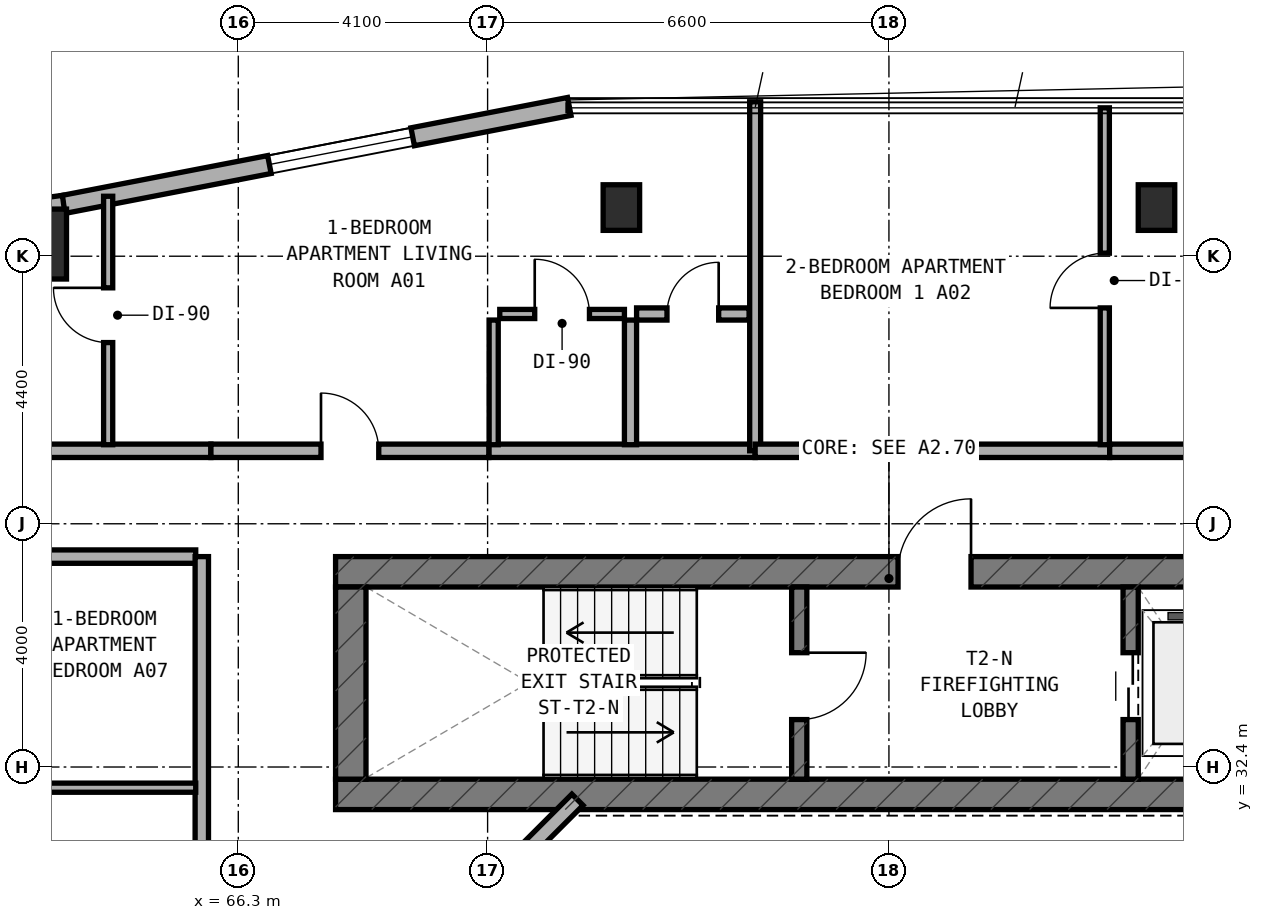
"""IFC4 building model, lengths in metres.
Left out: names, types, materials, properties, quantities, classifications, styles, units other than length and angle.
Written with IfcOpenShell. Run it as: python <this file> out.ifc"""

import sys

from ifc_helpers import new_model, si_unit, direction, frame, frame_2d, origin, origin_2d, place, context, subcontext, project, spatial, rectangle, extrude, element, fill, save


model = new_model("IFC4")
c1 = context("Model", 3, precision=1e-05, world=origin(), true_north=direction((0.0, 1.0)))
c2 = subcontext(c1, "Body", "Model", "MODEL_VIEW")
j1 = project(units=[si_unit("LENGTHUNIT", "METRE"), si_unit("PLANEANGLEUNIT", "RADIAN")], contexts=[c1])
p1 = place(None, origin())
s1 = spatial("IfcSite", under=j1, at=p1, CompositionType="ELEMENT")
p2 = place(p1, origin())
s2 = spatial("IfcBuilding", under=s1, at=p2, CompositionType="ELEMENT")
p3 = place(p2, frame((0.0, 0.0, 80.0)))
s3 = spatial("IfcBuildingStorey", under=s2, at=p3, CompositionType="ELEMENT", Elevation=80.0)
p4 = place(p3, frame((67.9, 31.95, 0.0), z_axis=(0.0, 0.0, 1.0), x_axis=(1.0, 0.0, 0.0)))
e1 = element("IfcWall", 1, at=p4, inside=s3, PredefinedType="SHEAR", context=c2, shape_type="SweptSolid", body=[
    extrude(rectangle(XDim=18.4, YDim=0.5, at=frame_2d((9.2, 0.0))), origin(), (0.0, 0.0, 1.0), 3.5),
])
p5 = place(p3, frame((67.9, 35.61, 0.0), z_axis=(0.0, 0.0, 1.0), x_axis=(1.0, 0.0, 0.0)))
e2 = element("IfcWall", 2, at=p5, inside=s3, PredefinedType="SHEAR", context=c2, shape_type="SweptSolid", body=[
    extrude(rectangle(XDim=18.4, YDim=0.5, at=frame_2d((9.2, 0.0))), origin(), (0.0, 0.0, 1.0), 3.5),
])
p6 = place(p5, frame((9.25, 0.0, 0.0)))
e3 = element("IfcOpeningElement", 3, at=p6, cuts=e2, PredefinedType="OPENING", context=c2, shape_type="SweptSolid", body=[
    extrude(rectangle(XDim=1.2, YDim=2.15, at=frame_2d((0.6, 1.075))), frame((0.0, 0.26, 0.0), z_axis=(0.0, -1.0, 0.0), x_axis=(1.0, 0.0, 0.0)), (0.0, 0.0, 1.0), 0.52),
])
p7 = place(p5, frame((16.85, 0.0, 0.0)))
e4 = element("IfcOpeningElement", 4, at=p7, cuts=e2, PredefinedType="OPENING", context=c2, shape_type="SweptSolid", body=[
    extrude(rectangle(XDim=0.85, YDim=2.1, at=frame_2d((0.425, 1.05))), frame((0.0, 0.26, 0.0), z_axis=(0.0, -1.0, 0.0), x_axis=(1.0, 0.0, 0.0)), (0.0, 0.0, 1.0), 0.52),
])
p8 = place(p3, frame((68.15, 32.2, 0.0), z_axis=(0.0, 0.0, 1.0), x_axis=(0.0, 1.0, 0.0)))
e5 = element("IfcWall", 5, at=p8, inside=s3, PredefinedType="SHEAR", context=c2, shape_type="SweptSolid", body=[
    extrude(rectangle(XDim=3.16, YDim=0.5, at=frame_2d((1.58, 0.0))), origin(), (0.0, 0.0, 1.0), 3.5),
])
p9 = place(p3, frame((75.525, 32.2, 0.0), z_axis=(0.0, 0.0, 1.0), x_axis=(0.0, 1.0, 0.0)))
e6 = element("IfcWall", 6, at=p9, inside=s3, PredefinedType="STANDARD", context=c2, shape_type="SweptSolid", body=[
    extrude(rectangle(XDim=3.16, YDim=0.25, at=frame_2d((1.58, 0.0))), origin(), (0.0, 0.0, 1.0), 3.25),
])
p10 = place(p9, frame((0.98, 0.0, 0.0)))
e7 = element("IfcOpeningElement", 7, at=p10, cuts=e6, PredefinedType="OPENING", context=c2, shape_type="SweptSolid", body=[
    extrude(rectangle(XDim=1.1, YDim=2.15, at=frame_2d((0.55, 1.075))), frame((0.0, 0.135, 0.0), z_axis=(0.0, -1.0, 0.0), x_axis=(1.0, 0.0, 0.0)), (0.0, 0.0, 1.0), 0.27),
])
p11 = place(p3, frame((80.975, 32.2, 0.0), z_axis=(0.0, 0.0, 1.0), x_axis=(0.0, 1.0, 0.0)))
e8 = element("IfcWall", 8, at=p11, inside=s3, PredefinedType="STANDARD", context=c2, shape_type="SweptSolid", body=[
    extrude(rectangle(XDim=3.16, YDim=0.25, at=frame_2d((1.58, 0.0))), origin(), (0.0, 0.0, 1.0), 3.25),
])
p12 = place(p11, frame((0.98, 0.0, 0.0)))
e9 = element("IfcOpeningElement", 9, at=p12, cuts=e8, PredefinedType="OPENING", context=c2, shape_type="SweptSolid", body=[
    extrude(rectangle(XDim=1.1, YDim=2.15, at=frame_2d((0.55, 1.075))), frame((0.0, 0.135, 0.0), z_axis=(0.0, -1.0, 0.0), x_axis=(1.0, 0.0, 0.0)), (0.0, 0.0, 1.0), 0.27),
])
for number, where, z_axis, x_axis in (
    (10, (72.6, 41.6, 0.0), (0.0, 0.0, 1.0), (1.0, 0.0, 0.0)),
    (11, (81.4, 41.6, 0.0), (0.0, 0.0, 1.0), (1.0, 0.0, 0.0)),
):
    element("IfcColumn", number, at=place(p3, frame(where, z_axis=z_axis, x_axis=x_axis)), inside=s3, PredefinedType="COLUMN", context=c2, shape_type="SweptSolid", body=[
        extrude(rectangle(XDim=0.6, YDim=0.75, at=origin_2d()), origin(), (0.0, 0.0, 1.0), 3.5),
    ])
p13 = place(p3, frame((63.0, 41.0, 0.0), z_axis=(0.0, 0.0, 1.0), x_axis=(1.0, 0.0, 0.0)))
e12 = element("IfcColumn", 12, at=p13, inside=s3, PredefinedType="COLUMN", context=c2, shape_type="SweptSolid", body=[
    extrude(rectangle(XDim=0.95, YDim=1.15, at=origin_2d()), origin(), (0.0, 0.0, 1.0), 3.5),
])
p14 = place(p3, frame((71.743, 43.263, 0.0), z_axis=(0.0, 0.0, 1.0), x_axis=(-0.981750199588, -0.190175039396, 0.0)))
e13 = element("IfcWall", 13, at=p14, inside=s3, PredefinedType="STANDARD", context=c2, shape_type="SweptSolid", body=[
    extrude(rectangle(XDim=8.477, YDim=0.3, at=frame_2d((4.238, 0.0))), origin(), (0.0, 0.0, 1.0), 3.25),
])
p15 = place(p14, frame((2.623, 0.0, 0.8)))
e14 = element("IfcOpeningElement", 14, at=p15, cuts=e13, PredefinedType="OPENING", context=c2, shape_type="SweptSolid", body=[
    extrude(rectangle(XDim=2.4, YDim=1.6, at=frame_2d((1.2, 0.8))), frame((0.0, 0.16, 0.0), z_axis=(0.0, -1.0, 0.0), x_axis=(1.0, 0.0, 0.0)), (0.0, 0.0, 1.0), 0.32),
])
p16 = place(p3, frame((63.428, 41.652, 0.0), z_axis=(0.0, 0.0, 1.0), x_axis=(-0.991293937098, -0.131667498923, 0.0)))
e15 = element("IfcWall", 15, at=p16, inside=s3, PredefinedType="STANDARD", context=c2, shape_type="SweptSolid", body=[
    extrude(rectangle(XDim=0.677, YDim=0.3, at=frame_2d((0.338, 0.0))), origin(), (0.0, 0.0, 1.0), 3.25),
])
p17 = place(p3, frame((71.878, 31.862, 0.0), z_axis=(0.0, 0.0, 1.0), x_axis=(-0.707106781187, -0.707106781187, 0.0)))
e16 = element("IfcWall", 16, at=p17, inside=s3, PredefinedType="STANDARD", context=c2, shape_type="SweptSolid", body=[
    extrude(rectangle(XDim=2.311, YDim=0.26, at=frame_2d((1.155, 0.0))), origin(), (0.0, 0.0, 1.0), 3.25),
])
p18 = place(p3, frame((59.36, 37.6, 0.0), z_axis=(0.0, 0.0, 1.0), x_axis=(1.0, 0.0, 0.0)))
e17 = element("IfcWall", 17, at=p18, inside=s3, PredefinedType="SOLIDWALL", context=c2, shape_type="SweptSolid", body=[
    extrude(rectangle(XDim=6.49, YDim=0.22, at=frame_2d((3.245, 0.0))), origin(), (0.0, 0.0, 1.0), 2.945),
])
p19 = place(p3, frame((70.42, 37.6, 0.0), z_axis=(0.0, 0.0, 1.0), x_axis=(1.0, 0.0, 0.0)))
e18 = element("IfcWall", 18, at=p19, inside=s3, PredefinedType="SOLIDWALL", context=c2, shape_type="SweptSolid", body=[
    extrude(rectangle(XDim=4.38, YDim=0.22, at=frame_2d((2.19, 0.0))), origin(), (0.0, 0.0, 1.0), 2.825),
])
p20 = place(p3, frame((65.85, 37.6, 0.0), z_axis=(0.0, 0.0, 1.0), x_axis=(1.0, 0.0, 0.0)))
e19 = element("IfcWall", 19, at=p20, inside=s3, PredefinedType="SOLIDWALL", context=c2, shape_type="SweptSolid", body=[
    extrude(rectangle(XDim=4.57, YDim=0.22, at=frame_2d((2.285, 0.0))), origin(), (0.0, 0.0, 1.0), 3.22),
])
p21 = place(p20, frame((1.81, 0.0, 0.0)))
e20 = element("IfcOpeningElement", 20, at=p21, cuts=e19, PredefinedType="OPENING", context=c2, shape_type="SweptSolid", body=[
    extrude(rectangle(XDim=0.95, YDim=2.1, at=frame_2d((0.475, 1.05))), frame((0.0, 0.12, 0.0), z_axis=(0.0, -1.0, 0.0), x_axis=(1.0, 0.0, 0.0)), (0.0, 0.0, 1.0), 0.24),
])
p22 = place(p3, frame((64.16, 37.7, 0.0), z_axis=(0.0, 0.0, 1.0), x_axis=(0.0, 1.0, 0.0)))
e21 = element("IfcWall", 21, at=p22, inside=s3, PredefinedType="PARTITIONING", context=c2, shape_type="SweptSolid", body=[
    extrude(rectangle(XDim=4.086, YDim=0.15, at=frame_2d((2.043, 0.0))), origin(), (0.0, 0.0, 1.0), 2.945),
])
p23 = place(p22, frame((1.68, 0.0, 0.0)))
e22 = element("IfcOpeningElement", 22, at=p23, cuts=e21, PredefinedType="OPENING", context=c2, shape_type="SweptSolid", body=[
    extrude(rectangle(XDim=0.9, YDim=2.1, at=frame_2d((0.45, 1.05))), frame((0.0, 0.085, 0.0), z_axis=(0.0, -1.0, 0.0), x_axis=(1.0, 0.0, 0.0)), (0.0, 0.0, 1.0), 0.17),
])
p24 = place(p3, frame((72.75, 37.7, 0.0), z_axis=(0.0, 0.0, 1.0), x_axis=(0.0, 1.0, 0.0)))
e23 = element("IfcWall", 23, at=p24, inside=s3, PredefinedType="PLUMBINGWALL", context=c2, shape_type="SweptSolid", body=[
    extrude(rectangle(XDim=2.05, YDim=0.2, at=frame_2d((1.025, 0.0))), origin(), (0.0, 0.0, 1.0), 2.825),
])
p25 = place(p3, frame((70.5, 37.7, 0.0), z_axis=(0.0, 0.0, 1.0), x_axis=(0.0, 1.0, 0.0)))
e24 = element("IfcWall", 24, at=p25, inside=s3, PredefinedType="PARTITIONING", context=c2, shape_type="SweptSolid", body=[
    extrude(rectangle(XDim=2.05, YDim=0.15, at=frame_2d((1.025, 0.0))), origin(), (0.0, 0.0, 1.0), 3.22),
])
p26 = place(p3, frame((72.85, 39.85, 0.0), z_axis=(0.0, 0.0, 1.0), x_axis=(1.0, 0.0, 0.0)))
e25 = element("IfcWall", 25, at=p26, inside=s3, PredefinedType="PLUMBINGWALL", context=c2, shape_type="SweptSolid", body=[
    extrude(rectangle(XDim=1.85, YDim=0.2, at=frame_2d((0.925, 0.0))), origin(), (0.0, 0.0, 1.0), 3.22),
])
p27 = place(p26, frame((0.5, 0.0, 0.0)))
e26 = element("IfcOpeningElement", 26, at=p27, cuts=e25, PredefinedType="OPENING", context=c2, shape_type="SweptSolid", body=[
    extrude(rectangle(XDim=0.85, YDim=2.1, at=frame_2d((0.425, 1.05))), frame((0.0, 0.11, 0.0), z_axis=(0.0, -1.0, 0.0), x_axis=(1.0, 0.0, 0.0)), (0.0, 0.0, 1.0), 0.22),
])
p28 = place(p3, frame((70.6, 39.85, 0.0), z_axis=(0.0, 0.0, 1.0), x_axis=(1.0, 0.0, 0.0)))
e27 = element("IfcWall", 27, at=p28, inside=s3, PredefinedType="PARTITIONING", context=c2, shape_type="SweptSolid", body=[
    extrude(rectangle(XDim=2.05, YDim=0.15, at=frame_2d((1.025, 0.0))), origin(), (0.0, 0.0, 1.0), 2.825),
])
p29 = place(p28, frame((0.575, 0.0, 0.0)))
e28 = element("IfcOpeningElement", 28, at=p29, cuts=e27, PredefinedType="OPENING", context=c2, shape_type="SweptSolid", body=[
    extrude(rectangle(XDim=0.9, YDim=2.1, at=frame_2d((0.45, 1.05))), frame((0.0, 0.085, 0.0), z_axis=(0.0, -1.0, 0.0), x_axis=(1.0, 0.0, 0.0)), (0.0, 0.0, 1.0), 0.17),
])
p30 = place(p3, frame((74.8, 37.6, 0.0), z_axis=(0.0, 0.0, 1.0), x_axis=(0.0, 1.0, 0.0)))
e29 = element("IfcWall", 29, at=p30, inside=s3, PredefinedType="SOLIDWALL", context=c2, shape_type="SweptSolid", body=[
    extrude(rectangle(XDim=5.74, YDim=0.18, at=frame_2d((2.87, 0.0))), origin(), (0.0, 0.0, 1.0), 2.825),
])
p31 = place(p3, frame((74.8, 37.6, 0.0), z_axis=(0.0, 0.0, 1.0), x_axis=(1.0, 0.0, 0.0)))
e30 = element("IfcWall", 30, at=p31, inside=s3, PredefinedType="SOLIDWALL", context=c2, shape_type="SweptSolid", body=[
    extrude(rectangle(XDim=5.83, YDim=0.22, at=frame_2d((2.915, 0.0))), origin(), (0.0, 0.0, 1.0), 3.22),
])
p32 = place(p3, frame((80.63, 37.6, 0.0), z_axis=(0.0, 0.0, 1.0), x_axis=(1.0, 0.0, 0.0)))
e31 = element("IfcWall", 31, at=p32, inside=s3, PredefinedType="SOLIDWALL", context=c2, shape_type="SweptSolid", body=[
    extrude(rectangle(XDim=3.88, YDim=0.22, at=frame_2d((1.94, 0.0))), origin(), (0.0, 0.0, 1.0), 2.825),
])
p33 = place(p32, frame((1.465, 0.0, 0.0)))
e32 = element("IfcOpeningElement", 32, at=p33, cuts=e31, PredefinedType="OPENING", context=c2, shape_type="SweptSolid", body=[
    extrude(rectangle(XDim=0.95, YDim=2.1, at=frame_2d((0.475, 1.05))), frame((0.0, 0.12, 0.0), z_axis=(0.0, -1.0, 0.0), x_axis=(1.0, 0.0, 0.0)), (0.0, 0.0, 1.0), 0.24),
])
p34 = place(p3, frame((80.55, 37.7, 0.0), z_axis=(0.0, 0.0, 1.0), x_axis=(0.0, 1.0, 0.0)))
e33 = element("IfcWall", 33, at=p34, inside=s3, PredefinedType="PARTITIONING", context=c2, shape_type="SweptSolid", body=[
    extrude(rectangle(XDim=5.54, YDim=0.15, at=frame_2d((2.77, 0.0))), origin(), (0.0, 0.0, 1.0), 2.825),
])
p35 = place(p34, frame((2.25, 0.0, 0.0)))
e34 = element("IfcOpeningElement", 34, at=p35, cuts=e33, PredefinedType="OPENING", context=c2, shape_type="SweptSolid", body=[
    extrude(rectangle(XDim=0.9, YDim=2.1, at=frame_2d((0.45, 1.05))), frame((0.0, 0.085, 0.0), z_axis=(0.0, -1.0, 0.0), x_axis=(1.0, 0.0, 0.0)), (0.0, 0.0, 1.0), 0.17),
])
p36 = place(p3, frame((59.52, 35.86, 0.0), z_axis=(0.0, 0.0, 1.0), x_axis=(1.0, 0.0, 0.0)))
e35 = element("IfcWall", 35, at=p36, inside=s3, PredefinedType="SOLIDWALL", context=c2, shape_type="SweptSolid", body=[
    extrude(rectangle(XDim=6.08, YDim=0.22, at=frame_2d((3.04, 0.0))), origin(), (0.0, 0.0, 1.0), 2.945),
])
p37 = place(p3, frame((65.7, 27.9, 0.0), z_axis=(0.0, 0.0, 1.0), x_axis=(0.0, 1.0, 0.0)))
e36 = element("IfcWall", 36, at=p37, inside=s3, PredefinedType="SOLIDWALL", context=c2, shape_type="SweptSolid", body=[
    extrude(rectangle(XDim=7.96, YDim=0.22, at=frame_2d((3.98, 0.0))), origin(), (0.0, 0.0, 1.0), 2.825),
])
p38 = place(p37, frame((1.605, 0.0, 0.0)))
e37 = element("IfcOpeningElement", 37, at=p38, cuts=e36, PredefinedType="OPENING", context=c2, shape_type="SweptSolid", body=[
    extrude(rectangle(XDim=0.95, YDim=2.1, at=frame_2d((0.475, 1.05))), frame((0.0, 0.12, 0.0), z_axis=(0.0, -1.0, 0.0), x_axis=(1.0, 0.0, 0.0)), (0.0, 0.0, 1.0), 0.24),
])
p39 = place(p3, frame((59.46, 32.06, 0.0), z_axis=(0.0, 0.0, 1.0), x_axis=(1.0, 0.0, 0.0)))
e38 = element("IfcWall", 38, at=p39, inside=s3, PredefinedType="PARTITIONING", context=c2, shape_type="SweptSolid", body=[
    extrude(rectangle(XDim=6.14, YDim=0.15, at=frame_2d((3.07, 0.0))), origin(), (0.0, 0.0, 1.0), 2.945),
])
p40 = place(p39, frame((2.79, 0.0, 0.0)))
e39 = element("IfcOpeningElement", 39, at=p40, cuts=e38, PredefinedType="OPENING", context=c2, shape_type="SweptSolid", body=[
    extrude(rectangle(XDim=0.9, YDim=2.1, at=frame_2d((0.45, 1.05))), frame((0.0, 0.085, 0.0), z_axis=(0.0, -1.0, 0.0), x_axis=(1.0, 0.0, 0.0)), (0.0, 0.0, 1.0), 0.17),
])
p41 = place(p15, origin())
e40 = element("IfcWindow", 40, at=p41, inside=s3, PartitioningType="SINGLE_PANEL", PredefinedType="WINDOW", context=c2, shape_type="SweptSolid", body=[
    extrude(rectangle(XDim=2.4, YDim=1.6, at=frame_2d((1.2, 0.8))), frame((0.0, 0.03, 0.0), z_axis=(0.0, -1.0, 0.0), x_axis=(1.0, 0.0, 0.0)), (0.0, 0.0, 1.0), 0.06),
])
fill(e14, e40)
p42 = place(p10, frame((1.1, 0.0, 0.0), z_axis=(0.0, 0.0, 1.0), x_axis=(-1.0, 0.0, 0.0)))
e41 = element("IfcDoor", 41, at=p42, inside=s3, OperationType="SINGLE_SWING_LEFT", PredefinedType="DOOR", context=c2, shape_type="SweptSolid", body=[
    extrude(rectangle(XDim=1.1, YDim=2.15, at=frame_2d((0.55, 1.075))), frame((0.0, 0.025, 0.0), z_axis=(0.0, -1.0, 0.0), x_axis=(1.0, 0.0, 0.0)), (0.0, 0.0, 1.0), 0.05),
])
fill(e7, e41)
p43 = place(p6, origin())
e42 = element("IfcDoor", 42, at=p43, inside=s3, OperationType="SINGLE_SWING_RIGHT", PredefinedType="DOOR", context=c2, shape_type="SweptSolid", body=[
    extrude(rectangle(XDim=1.2, YDim=2.15, at=frame_2d((0.6, 1.075))), frame((0.0, 0.025, 0.0), z_axis=(0.0, -1.0, 0.0), x_axis=(1.0, 0.0, 0.0)), (0.0, 0.0, 1.0), 0.05),
])
fill(e3, e42)
p44 = place(p12, origin())
e43 = element("IfcDoor", 43, at=p44, inside=s3, OperationType="DOUBLE_DOOR_SLIDING", PredefinedType="DOOR", context=c2, shape_type="SweptSolid", body=[
    extrude(rectangle(XDim=1.1, YDim=2.15, at=frame_2d((0.55, 1.075))), frame((0.0, 0.025, 0.0), z_axis=(0.0, -1.0, 0.0), x_axis=(1.0, 0.0, 0.0)), (0.0, 0.0, 1.0), 0.05),
])
fill(e9, e43)
p45 = place(p21, origin())
e44 = element("IfcDoor", 44, at=p45, inside=s3, OperationType="SINGLE_SWING_LEFT", PredefinedType="DOOR", context=c2, shape_type="SweptSolid", body=[
    extrude(rectangle(XDim=0.95, YDim=2.1, at=frame_2d((0.475, 1.05))), frame((0.0, 0.025, 0.0), z_axis=(0.0, -1.0, 0.0), x_axis=(1.0, 0.0, 0.0)), (0.0, 0.0, 1.0), 0.05),
])
fill(e20, e44)
p46 = place(p23, origin())
e45 = element("IfcDoor", 45, at=p46, inside=s3, OperationType="SINGLE_SWING_RIGHT", PredefinedType="DOOR", context=c2, shape_type="SweptSolid", body=[
    extrude(rectangle(XDim=0.9, YDim=2.1, at=frame_2d((0.45, 1.05))), frame((0.0, 0.025, 0.0), z_axis=(0.0, -1.0, 0.0), x_axis=(1.0, 0.0, 0.0)), (0.0, 0.0, 1.0), 0.05),
])
fill(e22, e45)
p47 = place(p27, origin())
e46 = element("IfcDoor", 46, at=p47, inside=s3, OperationType="SINGLE_SWING_RIGHT", PredefinedType="DOOR", context=c2, shape_type="SweptSolid", body=[
    extrude(rectangle(XDim=0.85, YDim=2.1, at=frame_2d((0.425, 1.05))), frame((0.0, 0.025, 0.0), z_axis=(0.0, -1.0, 0.0), x_axis=(1.0, 0.0, 0.0)), (0.0, 0.0, 1.0), 0.05),
])
fill(e26, e46)
p48 = place(p29, origin())
e47 = element("IfcDoor", 47, at=p48, inside=s3, OperationType="SINGLE_SWING_LEFT", PredefinedType="DOOR", context=c2, shape_type="SweptSolid", body=[
    extrude(rectangle(XDim=0.9, YDim=2.1, at=frame_2d((0.45, 1.05))), frame((0.0, 0.025, 0.0), z_axis=(0.0, -1.0, 0.0), x_axis=(1.0, 0.0, 0.0)), (0.0, 0.0, 1.0), 0.05),
])
fill(e28, e47)
p49 = place(p35, origin())
e48 = element("IfcDoor", 48, at=p49, inside=s3, OperationType="SINGLE_SWING_LEFT", PredefinedType="DOOR", context=c2, shape_type="SweptSolid", body=[
    extrude(rectangle(XDim=0.9, YDim=2.1, at=frame_2d((0.45, 1.05))), frame((0.0, 0.025, 0.0), z_axis=(0.0, -1.0, 0.0), x_axis=(1.0, 0.0, 0.0)), (0.0, 0.0, 1.0), 0.05),
])
fill(e34, e48)
save(model, sys.argv[1])
